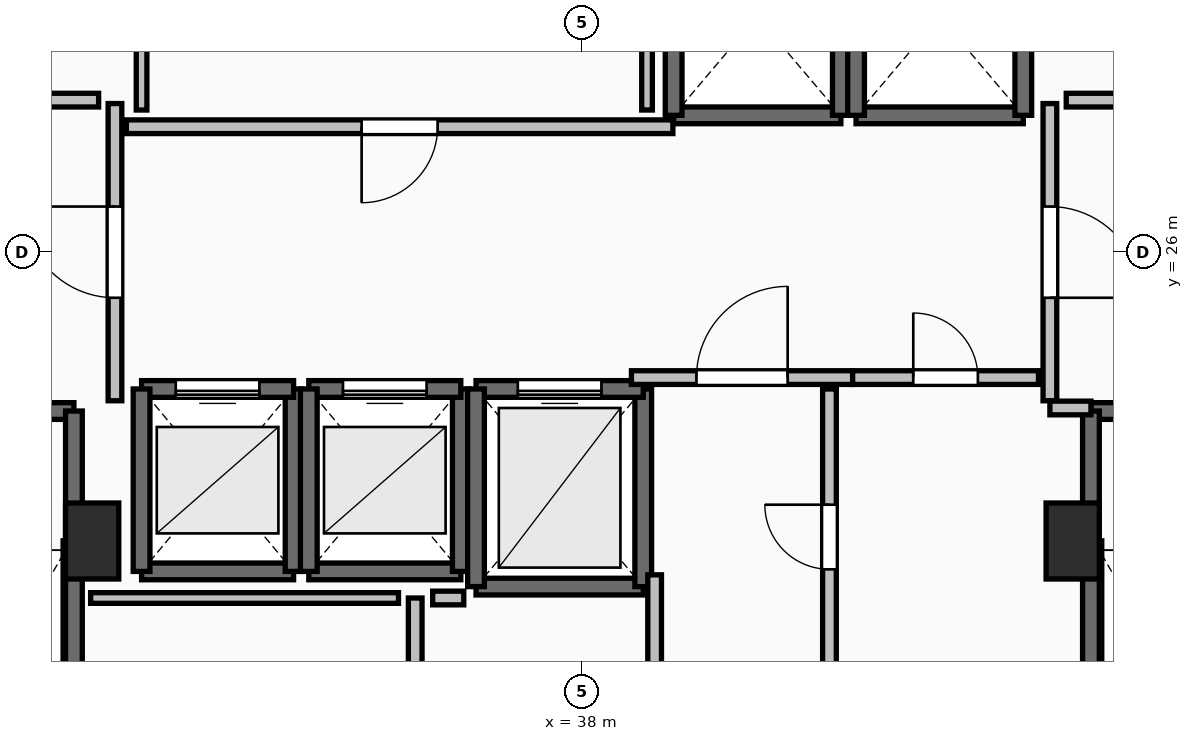
"""IFC4 building model, lengths in metres.
Left out: names, types, materials, properties, quantities, classifications, styles, units other than length and angle.
Written with IfcOpenShell. Run it as: python <this file> out.ifc"""

import sys

from ifc_helpers import new_model, si_unit, direction, frame, frame_2d, origin, origin_2d, place, context, subcontext, project, spatial, rectangle, extrude, element, fill, save


model = new_model("IFC4")
c1 = context("Model", 3, precision=1e-05, world=origin(), true_north=direction((0.0, 1.0)))
c2 = subcontext(c1, "Body", "Model", "MODEL_VIEW")
j1 = project(units=[si_unit("LENGTHUNIT", "METRE"), si_unit("PLANEANGLEUNIT", "RADIAN")], contexts=[c1])
p1 = place(None, origin())
s1 = spatial("IfcSite", under=j1, at=p1, CompositionType="ELEMENT")
p2 = place(p1, origin())
s2 = spatial("IfcBuilding", under=s1, at=p2, CompositionType="ELEMENT")
p3 = place(p2, frame((0.0, 0.0, 193.1)))
s3 = spatial("IfcBuildingStorey", under=s2, at=p3, CompositionType="ELEMENT", Elevation=193.1)
for number, where, z_axis, x_axis in (
    (1, (31.55, 22.2, 0.0), (0.0, 0.0, 1.0), (1.0, 0.0, 0.0)),
    (2, (44.45, 22.2, 0.0), (0.0, 0.0, 1.0), (1.0, 0.0, 0.0)),
):
    element("IfcColumn", number, at=place(p3, frame(where, z_axis=z_axis, x_axis=x_axis)), inside=s3, PredefinedType="PILASTER", context=c2, shape_type="SweptSolid", body=[
        extrude(rectangle(XDim=0.7, YDim=1.0, at=origin_2d()), origin(), (0.0, 0.0, 1.0), 3.5),
    ])
p4 = place(p3, frame((27.94, 23.91, 0.0), z_axis=(0.0, 0.0, 1.0), x_axis=(1.0, 0.0, 0.0)))
e3 = element("IfcWall", 3, at=p4, inside=s3, PredefinedType="SOLIDWALL", context=c2, shape_type="SweptSolid", body=[
    extrude(rectangle(XDim=3.37, YDim=0.22, at=frame_2d((1.685, 0.0))), origin(), (0.0, 0.0, 1.0), 3.24),
])
p5 = place(p4, frame((1.135, 0.0, 0.0)))
e4 = element("IfcOpeningElement", 4, at=p5, cuts=e3, PredefinedType="OPENING", context=c2, shape_type="SweptSolid", body=[
    extrude(rectangle(XDim=1.1, YDim=2.15, at=frame_2d((0.55, 1.075))), frame((0.0, 0.125, 0.0), z_axis=(0.0, -1.0, 0.0), x_axis=(1.0, 0.0, 0.0)), (0.0, 0.0, 1.0), 0.25),
])
p6 = place(p3, frame((31.31, 23.91, 0.0), z_axis=(0.0, 0.0, 1.0), x_axis=(0.0, -1.0, 0.0)))
e5 = element("IfcWall", 5, at=p6, inside=s3, PredefinedType="SOLIDWALL", context=c2, shape_type="SweptSolid", body=[
    extrude(rectangle(XDim=7.42, YDim=0.22, at=frame_2d((3.71, 0.0))), origin(), (0.0, 0.0, 1.0), 3.24),
])
p7 = place(p3, frame((44.69, 23.91, 0.0), z_axis=(0.0, 0.0, 1.0), x_axis=(1.0, 0.0, 0.0)))
e6 = element("IfcWall", 6, at=p7, inside=s3, PredefinedType="SOLIDWALL", context=c2, shape_type="SweptSolid", body=[
    extrude(rectangle(XDim=3.37, YDim=0.22, at=frame_2d((1.685, 0.0))), origin(), (0.0, 0.0, 1.0), 3.24),
])
p8 = place(p7, frame((1.135, 0.0, 0.0)))
e7 = element("IfcOpeningElement", 7, at=p8, cuts=e6, PredefinedType="OPENING", context=c2, shape_type="SweptSolid", body=[
    extrude(rectangle(XDim=1.1, YDim=2.15, at=frame_2d((0.55, 1.075))), frame((0.0, 0.125, 0.0), z_axis=(0.0, -1.0, 0.0), x_axis=(1.0, 0.0, 0.0)), (0.0, 0.0, 1.0), 0.25),
])
p9 = place(p3, frame((44.69, 16.49, 0.0), z_axis=(0.0, 0.0, 1.0), x_axis=(0.0, 1.0, 0.0)))
e8 = element("IfcWall", 8, at=p9, inside=s3, PredefinedType="SOLIDWALL", context=c2, shape_type="SweptSolid", body=[
    extrude(rectangle(XDim=7.42, YDim=0.22, at=frame_2d((3.71, 0.0))), origin(), (0.0, 0.0, 1.0), 3.24),
])
p10 = place(p3, frame((32.2, 21.8, 0.0), z_axis=(0.0, 0.0, 1.0), x_axis=(1.0, 0.0, 0.0)))
e9 = element("IfcWall", 9, at=p10, inside=s3, PredefinedType="SOLIDWALL", context=c2, shape_type="SweptSolid", body=[
    extrude(rectangle(XDim=2.0, YDim=0.22, at=frame_2d((1.0, 0.0))), origin(), (0.0, 0.0, 1.0), 3.24),
])
p11 = place(p3, frame((34.2, 21.8, 0.0), z_axis=(0.0, 0.0, 1.0), x_axis=(0.0, 1.0, 0.0)))
e10 = element("IfcWall", 10, at=p11, inside=s3, PredefinedType="SOLIDWALL", context=c2, shape_type="SweptSolid", body=[
    extrude(rectangle(XDim=2.4, YDim=0.22, at=frame_2d((1.2, 0.0))), origin(), (0.0, 0.0, 1.0), 3.24),
])
p12 = place(p3, frame((34.2, 24.2, 0.0), z_axis=(0.0, 0.0, 1.0), x_axis=(-1.0, 0.0, 0.0)))
e11 = element("IfcWall", 11, at=p12, inside=s3, PredefinedType="SOLIDWALL", context=c2, shape_type="SweptSolid", body=[
    extrude(rectangle(XDim=2.0, YDim=0.22, at=frame_2d((1.0, 0.0))), origin(), (0.0, 0.0, 1.0), 3.24),
])
p13 = place(p12, frame((0.45, 0.0, 0.0)))
e12 = element("IfcOpeningElement", 12, at=p13, cuts=e11, PredefinedType="OPENING", context=c2, shape_type="SweptSolid", body=[
    extrude(rectangle(XDim=1.1, YDim=2.2, at=frame_2d((0.55, 1.1))), frame((0.0, 0.125, 0.0), z_axis=(0.0, -1.0, 0.0), x_axis=(1.0, 0.0, 0.0)), (0.0, 0.0, 1.0), 0.25),
])
p14 = place(p3, frame((32.2, 24.2, 0.0), z_axis=(0.0, 0.0, 1.0), x_axis=(0.0, -1.0, 0.0)))
e13 = element("IfcWall", 13, at=p14, inside=s3, PredefinedType="SOLIDWALL", context=c2, shape_type="SweptSolid", body=[
    extrude(rectangle(XDim=2.4, YDim=0.22, at=frame_2d((1.2, 0.0))), origin(), (0.0, 0.0, 1.0), 3.24),
])
p15 = place(p3, frame((34.4, 21.8, 0.0), z_axis=(0.0, 0.0, 1.0), x_axis=(1.0, 0.0, 0.0)))
e14 = element("IfcWall", 14, at=p15, inside=s3, PredefinedType="SOLIDWALL", context=c2, shape_type="SweptSolid", body=[
    extrude(rectangle(XDim=2.0, YDim=0.22, at=frame_2d((1.0, 0.0))), origin(), (0.0, 0.0, 1.0), 3.24),
])
p16 = place(p3, frame((36.4, 21.8, 0.0), z_axis=(0.0, 0.0, 1.0), x_axis=(0.0, 1.0, 0.0)))
e15 = element("IfcWall", 15, at=p16, inside=s3, PredefinedType="SOLIDWALL", context=c2, shape_type="SweptSolid", body=[
    extrude(rectangle(XDim=2.4, YDim=0.22, at=frame_2d((1.2, 0.0))), origin(), (0.0, 0.0, 1.0), 3.24),
])
p17 = place(p3, frame((36.4, 24.2, 0.0), z_axis=(0.0, 0.0, 1.0), x_axis=(-1.0, 0.0, 0.0)))
e16 = element("IfcWall", 16, at=p17, inside=s3, PredefinedType="SOLIDWALL", context=c2, shape_type="SweptSolid", body=[
    extrude(rectangle(XDim=2.0, YDim=0.22, at=frame_2d((1.0, 0.0))), origin(), (0.0, 0.0, 1.0), 3.24),
])
p18 = place(p17, frame((0.45, 0.0, 0.0)))
e17 = element("IfcOpeningElement", 17, at=p18, cuts=e16, PredefinedType="OPENING", context=c2, shape_type="SweptSolid", body=[
    extrude(rectangle(XDim=1.1, YDim=2.2, at=frame_2d((0.55, 1.1))), frame((0.0, 0.125, 0.0), z_axis=(0.0, -1.0, 0.0), x_axis=(1.0, 0.0, 0.0)), (0.0, 0.0, 1.0), 0.25),
])
p19 = place(p3, frame((34.4, 24.2, 0.0), z_axis=(0.0, 0.0, 1.0), x_axis=(0.0, -1.0, 0.0)))
e18 = element("IfcWall", 18, at=p19, inside=s3, PredefinedType="SOLIDWALL", context=c2, shape_type="SweptSolid", body=[
    extrude(rectangle(XDim=2.4, YDim=0.22, at=frame_2d((1.2, 0.0))), origin(), (0.0, 0.0, 1.0), 3.24),
])
p20 = place(p3, frame((36.6, 21.6, 0.0), z_axis=(0.0, 0.0, 1.0), x_axis=(1.0, 0.0, 0.0)))
e19 = element("IfcWall", 19, at=p20, inside=s3, PredefinedType="SOLIDWALL", context=c2, shape_type="SweptSolid", body=[
    extrude(rectangle(XDim=2.2, YDim=0.22, at=frame_2d((1.1, 0.0))), origin(), (0.0, 0.0, 1.0), 3.24),
])
p21 = place(p3, frame((38.8, 21.6, 0.0), z_axis=(0.0, 0.0, 1.0), x_axis=(0.0, 1.0, 0.0)))
e20 = element("IfcWall", 20, at=p21, inside=s3, PredefinedType="SOLIDWALL", context=c2, shape_type="SweptSolid", body=[
    extrude(rectangle(XDim=2.6, YDim=0.22, at=frame_2d((1.3, 0.0))), origin(), (0.0, 0.0, 1.0), 3.24),
])
p22 = place(p3, frame((38.8, 24.2, 0.0), z_axis=(0.0, 0.0, 1.0), x_axis=(-1.0, 0.0, 0.0)))
e21 = element("IfcWall", 21, at=p22, inside=s3, PredefinedType="SOLIDWALL", context=c2, shape_type="SweptSolid", body=[
    extrude(rectangle(XDim=2.2, YDim=0.22, at=frame_2d((1.1, 0.0))), origin(), (0.0, 0.0, 1.0), 3.24),
])
p23 = place(p22, frame((0.55, 0.0, 0.0)))
e22 = element("IfcOpeningElement", 22, at=p23, cuts=e21, PredefinedType="OPENING", context=c2, shape_type="SweptSolid", body=[
    extrude(rectangle(XDim=1.1, YDim=2.2, at=frame_2d((0.55, 1.1))), frame((0.0, 0.125, 0.0), z_axis=(0.0, -1.0, 0.0), x_axis=(1.0, 0.0, 0.0)), (0.0, 0.0, 1.0), 0.25),
])
p24 = place(p3, frame((36.6, 24.2, 0.0), z_axis=(0.0, 0.0, 1.0), x_axis=(0.0, -1.0, 0.0)))
e23 = element("IfcWall", 23, at=p24, inside=s3, PredefinedType="SOLIDWALL", context=c2, shape_type="SweptSolid", body=[
    extrude(rectangle(XDim=2.6, YDim=0.22, at=frame_2d((1.3, 0.0))), origin(), (0.0, 0.0, 1.0), 3.24),
])
p25 = place(p3, frame((39.2, 27.8, 0.0), z_axis=(0.0, 0.0, 1.0), x_axis=(1.0, 0.0, 0.0)))
e24 = element("IfcWall", 24, at=p25, inside=s3, PredefinedType="SOLIDWALL", context=c2, shape_type="SweptSolid", body=[
    extrude(rectangle(XDim=2.2, YDim=0.22, at=frame_2d((1.1, 0.0))), origin(), (0.0, 0.0, 1.0), 3.24),
])
for number, where, z_axis, x_axis in (
    (25, (41.4, 27.8, 0.0), (0.0, 0.0, 1.0), (0.0, 1.0, 0.0)),
    (26, (39.2, 30.4, 0.0), (0.0, 0.0, 1.0), (0.0, -1.0, 0.0)),
):
    element("IfcWall", number, at=place(p3, frame(where, z_axis=z_axis, x_axis=x_axis)), inside=s3, PredefinedType="SOLIDWALL", context=c2, shape_type="SweptSolid", body=[
        extrude(rectangle(XDim=2.6, YDim=0.22, at=frame_2d((1.3, 0.0))), origin(), (0.0, 0.0, 1.0), 3.24),
    ])
p26 = place(p3, frame((41.6, 27.8, 0.0), z_axis=(0.0, 0.0, 1.0), x_axis=(1.0, 0.0, 0.0)))
e27 = element("IfcWall", 27, at=p26, inside=s3, PredefinedType="SOLIDWALL", context=c2, shape_type="SweptSolid", body=[
    extrude(rectangle(XDim=2.2, YDim=0.22, at=frame_2d((1.1, 0.0))), origin(), (0.0, 0.0, 1.0), 3.24),
])
for number, where, z_axis, x_axis in (
    (28, (43.8, 27.8, 0.0), (0.0, 0.0, 1.0), (0.0, 1.0, 0.0)),
    (29, (41.6, 30.4, 0.0), (0.0, 0.0, 1.0), (0.0, -1.0, 0.0)),
):
    element("IfcWall", number, at=place(p3, frame(where, z_axis=z_axis, x_axis=x_axis)), inside=s3, PredefinedType="SOLIDWALL", context=c2, shape_type="SweptSolid", body=[
        extrude(rectangle(XDim=2.6, YDim=0.22, at=frame_2d((1.3, 0.0))), origin(), (0.0, 0.0, 1.0), 3.24),
    ])
p27 = place(p3, frame((31.85, 24.045, 0.0), z_axis=(0.0, 0.0, 1.0), x_axis=(0.0, 1.0, 0.0)))
e30 = element("IfcWall", 30, at=p27, inside=s3, PredefinedType="PARTITIONING", context=c2, shape_type="SweptSolid", body=[
    extrude(rectangle(XDim=3.91, YDim=0.18, at=frame_2d((1.955, 0.0))), origin(), (0.0, 0.0, 1.0), 3.24),
])
p28 = place(p27, frame((1.355, 0.0, 0.0)))
e31 = element("IfcOpeningElement", 31, at=p28, cuts=e30, PredefinedType="OPENING", context=c2, shape_type="SweptSolid", body=[
    extrude(rectangle(XDim=1.2, YDim=2.15, at=frame_2d((0.6, 1.075))), frame((0.0, 0.105, 0.0), z_axis=(0.0, -1.0, 0.0), x_axis=(1.0, 0.0, 0.0)), (0.0, 0.0, 1.0), 0.21),
])
p29 = place(p3, frame((44.15, 27.955, 0.0), z_axis=(0.0, 0.0, 1.0), x_axis=(0.0, -1.0, 0.0)))
e32 = element("IfcWall", 32, at=p29, inside=s3, PredefinedType="PARTITIONING", context=c2, shape_type="SweptSolid", body=[
    extrude(rectangle(XDim=3.91, YDim=0.18, at=frame_2d((1.955, 0.0))), origin(), (0.0, 0.0, 1.0), 3.24),
])
p30 = place(p29, frame((1.355, 0.0, 0.0)))
e33 = element("IfcOpeningElement", 33, at=p30, cuts=e32, PredefinedType="OPENING", context=c2, shape_type="SweptSolid", body=[
    extrude(rectangle(XDim=1.2, YDim=2.15, at=frame_2d((0.6, 1.075))), frame((0.0, 0.105, 0.0), z_axis=(0.0, -1.0, 0.0), x_axis=(1.0, 0.0, 0.0)), (0.0, 0.0, 1.0), 0.21),
])
p31 = place(p3, frame((44.15, 23.95, 0.0), z_axis=(0.0, 0.0, 1.0), x_axis=(1.0, 0.0, 0.0)))
e34 = element("IfcWall", 34, at=p31, inside=s3, PredefinedType="PARTITIONING", context=c2, shape_type="SweptSolid", body=[
    extrude(rectangle(XDim=0.54, YDim=0.18, at=frame_2d((0.27, 0.0))), origin(), (0.0, 0.0, 1.0), 3.24),
])
p32 = place(p3, frame((38.645, 24.35, 0.0), z_axis=(0.0, 0.0, 1.0), x_axis=(1.0, 0.0, 0.0)))
e35 = element("IfcWall", 35, at=p32, inside=s3, PredefinedType="PARTITIONING", context=c2, shape_type="SweptSolid", body=[
    extrude(rectangle(XDim=2.91, YDim=0.18, at=frame_2d((1.455, 0.0))), origin(), (0.0, 0.0, 1.0), 3.24),
])
p33 = place(p32, frame((0.855, 0.0, 0.0)))
e36 = element("IfcOpeningElement", 36, at=p33, cuts=e35, PredefinedType="OPENING", context=c2, shape_type="SweptSolid", body=[
    extrude(rectangle(XDim=1.2, YDim=2.15, at=frame_2d((0.6, 1.075))), frame((0.0, 0.105, 0.0), z_axis=(0.0, -1.0, 0.0), x_axis=(1.0, 0.0, 0.0)), (0.0, 0.0, 1.0), 0.21),
])
p34 = place(p3, frame((41.555, 24.35, 0.0), z_axis=(0.0, 0.0, 1.0), x_axis=(1.0, 0.0, 0.0)))
e37 = element("IfcWall", 37, at=p34, inside=s3, PredefinedType="PARTITIONING", context=c2, shape_type="SweptSolid", body=[
    extrude(rectangle(XDim=2.445, YDim=0.18, at=frame_2d((1.223, 0.0))), origin(), (0.0, 0.0, 1.0), 3.24),
])
p35 = place(p34, frame((0.798, 0.0, 0.0)))
e38 = element("IfcOpeningElement", 38, at=p35, cuts=e37, PredefinedType="OPENING", context=c2, shape_type="SweptSolid", body=[
    extrude(rectangle(XDim=0.85, YDim=2.1, at=frame_2d((0.425, 1.05))), frame((0.0, 0.105, 0.0), z_axis=(0.0, -1.0, 0.0), x_axis=(1.0, 0.0, 0.0)), (0.0, 0.0, 1.0), 0.21),
])
p36 = place(p3, frame((39.19, 27.65, 0.0), z_axis=(0.0, 0.0, 1.0), x_axis=(-1.0, 0.0, 0.0)))
e39 = element("IfcWall", 39, at=p36, inside=s3, PredefinedType="PARTITIONING", context=c2, shape_type="SweptSolid", body=[
    extrude(rectangle(XDim=7.19, YDim=0.18, at=frame_2d((3.595, 0.0))), origin(), (0.0, 0.0, 1.0), 3.24),
])
p37 = place(p36, frame((3.095, 0.0, 0.0)))
e40 = element("IfcOpeningElement", 40, at=p37, cuts=e39, PredefinedType="OPENING", context=c2, shape_type="SweptSolid", body=[
    extrude(rectangle(XDim=1.0, YDim=2.15, at=frame_2d((0.5, 1.075))), frame((0.0, 0.105, 0.0), z_axis=(0.0, -1.0, 0.0), x_axis=(1.0, 0.0, 0.0)), (0.0, 0.0, 1.0), 0.21),
])
p38 = place(p3, frame((41.25, 20.305, 0.0), z_axis=(0.0, 0.0, 1.0), x_axis=(0.0, 1.0, 0.0)))
e41 = element("IfcWall", 41, at=p38, inside=s3, PredefinedType="PARTITIONING", context=c2, shape_type="SweptSolid", body=[
    extrude(rectangle(XDim=3.895, YDim=0.18, at=frame_2d((1.948, 0.0))), origin(), (0.0, 0.0, 1.0), 3.24),
])
p39 = place(p38, frame((1.522, 0.0, 0.0)))
e42 = element("IfcOpeningElement", 42, at=p39, cuts=e41, PredefinedType="OPENING", context=c2, shape_type="SweptSolid", body=[
    extrude(rectangle(XDim=0.85, YDim=2.1, at=frame_2d((0.425, 1.05))), frame((0.0, 0.105, 0.0), z_axis=(0.0, -1.0, 0.0), x_axis=(1.0, 0.0, 0.0)), (0.0, 0.0, 1.0), 0.21),
])
p40 = place(p3, frame((38.95, 21.755, 0.0), z_axis=(0.0, 0.0, 1.0), x_axis=(0.0, -1.0, 0.0)))
e43 = element("IfcWall", 43, at=p40, inside=s3, PredefinedType="PARTITIONING", context=c2, shape_type="SweptSolid", body=[
    extrude(rectangle(XDim=5.435, YDim=0.18, at=frame_2d((2.717, 0.0))), origin(), (0.0, 0.0, 1.0), 3.24),
])
p41 = place(p40, frame((2.018, 0.0, 0.0)))
e44 = element("IfcOpeningElement", 44, at=p41, cuts=e43, PredefinedType="OPENING", context=c2, shape_type="SweptSolid", body=[
    extrude(rectangle(XDim=1.4, YDim=2.2, at=frame_2d((0.7, 1.1))), frame((0.0, 0.105, 0.0), z_axis=(0.0, -1.0, 0.0), x_axis=(1.0, 0.0, 0.0)), (0.0, 0.0, 1.0), 0.21),
])
p42 = place(p3, frame((35.8, 16.32, 0.0), z_axis=(0.0, 0.0, 1.0), x_axis=(0.0, 1.0, 0.0)))
e45 = element("IfcWall", 45, at=p42, inside=s3, PredefinedType="PARTITIONING", context=c2, shape_type="SweptSolid", body=[
    extrude(rectangle(XDim=5.13, YDim=0.18, at=frame_2d((2.565, 0.0))), origin(), (0.0, 0.0, 1.0), 3.24),
])
for number, where, z_axis, x_axis in (
    (46, (31.635, 28.0, 0.0), (0.0, 0.0, 1.0), (-1.0, 0.0, 0.0)),
    (47, (45.28, 28.0, 0.0), (0.0, 0.0, 1.0), (-1.0, 0.0, 0.0)),
):
    element("IfcWall", number, at=place(p3, frame(where, z_axis=z_axis, x_axis=x_axis)), inside=s3, PredefinedType="PARTITIONING", context=c2, shape_type="SweptSolid", body=[
        extrude(rectangle(XDim=0.915, YDim=0.18, at=frame_2d((0.458, 0.0))), origin(), (0.0, 0.0, 1.0), 3.24),
    ])
p43 = place(p3, frame((35.58, 21.45, 0.0), z_axis=(0.0, 0.0, 1.0), x_axis=(-1.0, 0.0, 0.0)))
e48 = element("IfcWall", 48, at=p43, inside=s3, PredefinedType="PARTITIONING", context=c2, shape_type="SweptSolid", body=[
    extrude(rectangle(XDim=4.05, YDim=0.14, at=frame_2d((2.025, 0.0))), origin(), (0.0, 0.0, 1.0), 3.24),
])
p44 = place(p3, frame((36.439, 21.45, 0.0), z_axis=(0.0, 0.0, 1.0), x_axis=(-1.0, 0.0, 0.0)))
e49 = element("IfcWall", 49, at=p44, inside=s3, PredefinedType="PARTITIONING", context=c2, shape_type="SweptSolid", body=[
    extrude(rectangle(XDim=0.409, YDim=0.18, at=frame_2d((0.205, 0.0))), origin(), (0.0, 0.0, 1.0), 3.24),
])
for number, where, z_axis, x_axis in (
    (50, (32.2, 30.26, 0.0), (0.0, 0.0, 1.0), (0.0, -1.0, 0.0)),
    (51, (38.85, 27.87, 0.0), (0.0, 0.0, 1.0), (0.0, 1.0, 0.0)),
):
    element("IfcWall", number, at=place(p3, frame(where, z_axis=z_axis, x_axis=x_axis)), inside=s3, PredefinedType="PARTITIONING", context=c2, shape_type="SweptSolid", body=[
        extrude(rectangle(XDim=2.39, YDim=0.14, at=frame_2d((1.195, 0.0))), origin(), (0.0, 0.0, 1.0), 3.24),
    ])
p45 = place(p13, origin())
e52 = element("IfcDoor", 52, at=p45, inside=s3, OperationType="SLIDING_TO_LEFT", PredefinedType="DOOR", context=c2, shape_type="SweptSolid", body=[
    extrude(rectangle(XDim=1.1, YDim=2.2, at=frame_2d((0.55, 1.1))), frame((0.0, 0.025, 0.0), z_axis=(0.0, -1.0, 0.0), x_axis=(1.0, 0.0, 0.0)), (0.0, 0.0, 1.0), 0.05),
])
fill(e12, e52)
p46 = place(p18, origin())
e53 = element("IfcDoor", 53, at=p46, inside=s3, OperationType="SLIDING_TO_LEFT", PredefinedType="DOOR", context=c2, shape_type="SweptSolid", body=[
    extrude(rectangle(XDim=1.1, YDim=2.2, at=frame_2d((0.55, 1.1))), frame((0.0, 0.025, 0.0), z_axis=(0.0, -1.0, 0.0), x_axis=(1.0, 0.0, 0.0)), (0.0, 0.0, 1.0), 0.05),
])
fill(e17, e53)
p47 = place(p23, origin())
e54 = element("IfcDoor", 54, at=p47, inside=s3, OperationType="SLIDING_TO_LEFT", PredefinedType="DOOR", context=c2, shape_type="SweptSolid", body=[
    extrude(rectangle(XDim=1.1, YDim=2.2, at=frame_2d((0.55, 1.1))), frame((0.0, 0.025, 0.0), z_axis=(0.0, -1.0, 0.0), x_axis=(1.0, 0.0, 0.0)), (0.0, 0.0, 1.0), 0.05),
])
fill(e22, e54)
p48 = place(p28, origin())
e55 = element("IfcDoor", 55, at=p48, inside=s3, OperationType="SINGLE_SWING_RIGHT", PredefinedType="DOOR", context=c2, shape_type="SweptSolid", body=[
    extrude(rectangle(XDim=1.2, YDim=2.15, at=frame_2d((0.6, 1.075))), frame((0.0, 0.025, 0.0), z_axis=(0.0, -1.0, 0.0), x_axis=(1.0, 0.0, 0.0)), (0.0, 0.0, 1.0), 0.05),
])
fill(e31, e55)
p49 = place(p30, origin())
e56 = element("IfcDoor", 56, at=p49, inside=s3, OperationType="SINGLE_SWING_RIGHT", PredefinedType="DOOR", context=c2, shape_type="SweptSolid", body=[
    extrude(rectangle(XDim=1.2, YDim=2.15, at=frame_2d((0.6, 1.075))), frame((0.0, 0.025, 0.0), z_axis=(0.0, -1.0, 0.0), x_axis=(1.0, 0.0, 0.0)), (0.0, 0.0, 1.0), 0.05),
])
fill(e33, e56)
p50 = place(p33, origin())
e57 = element("IfcDoor", 57, at=p50, inside=s3, OperationType="SINGLE_SWING_RIGHT", PredefinedType="DOOR", context=c2, shape_type="SweptSolid", body=[
    extrude(rectangle(XDim=1.2, YDim=2.15, at=frame_2d((0.6, 1.075))), frame((0.0, 0.025, 0.0), z_axis=(0.0, -1.0, 0.0), x_axis=(1.0, 0.0, 0.0)), (0.0, 0.0, 1.0), 0.05),
])
fill(e36, e57)
p51 = place(p35, origin())
e58 = element("IfcDoor", 58, at=p51, inside=s3, OperationType="SINGLE_SWING_LEFT", PredefinedType="DOOR", context=c2, shape_type="SweptSolid", body=[
    extrude(rectangle(XDim=0.85, YDim=2.1, at=frame_2d((0.425, 1.05))), frame((0.0, 0.025, 0.0), z_axis=(0.0, -1.0, 0.0), x_axis=(1.0, 0.0, 0.0)), (0.0, 0.0, 1.0), 0.05),
])
fill(e38, e58)
p52 = place(p37, origin())
e59 = element("IfcDoor", 59, at=p52, inside=s3, OperationType="SINGLE_SWING_RIGHT", PredefinedType="DOOR", context=c2, shape_type="SweptSolid", body=[
    extrude(rectangle(XDim=1.0, YDim=2.15, at=frame_2d((0.5, 1.075))), frame((0.0, 0.025, 0.0), z_axis=(0.0, -1.0, 0.0), x_axis=(1.0, 0.0, 0.0)), (0.0, 0.0, 1.0), 0.05),
])
fill(e40, e59)
p53 = place(p39, origin())
e60 = element("IfcDoor", 60, at=p53, inside=s3, OperationType="SINGLE_SWING_RIGHT", PredefinedType="DOOR", context=c2, shape_type="SweptSolid", body=[
    extrude(rectangle(XDim=0.85, YDim=2.1, at=frame_2d((0.425, 1.05))), frame((0.0, 0.025, 0.0), z_axis=(0.0, -1.0, 0.0), x_axis=(1.0, 0.0, 0.0)), (0.0, 0.0, 1.0), 0.05),
])
fill(e42, e60)
save(model, sys.argv[1])
